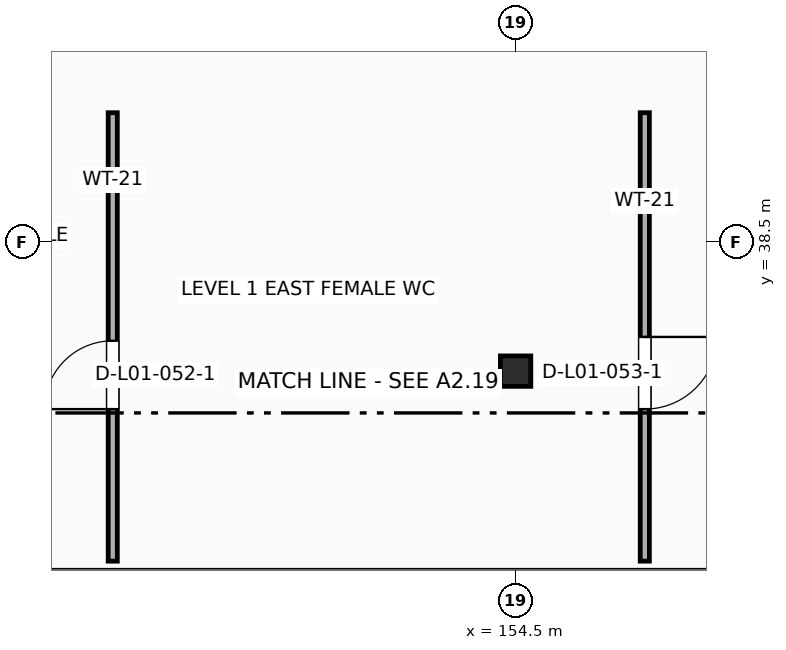
"""IFC4 building model, lengths in metres.
Left out: names, types, materials, properties, quantities, classifications, styles, units other than length and angle.
Written with IfcOpenShell. Run it as: python <this file> out.ifc"""

import sys

from ifc_helpers import new_model, si_unit, direction, frame, frame_2d, origin, origin_2d, place, context, subcontext, project, spatial, rectangle, hollow_rectangle, extrude, element, fill, save


model = new_model("IFC4")
c1 = context("Model", 3, precision=1e-05, world=origin(), true_north=direction((0.0, 1.0)))
c2 = subcontext(c1, "Body", "Model", "MODEL_VIEW")
j1 = project(units=[si_unit("LENGTHUNIT", "METRE"), si_unit("PLANEANGLEUNIT", "RADIAN")], contexts=[c1])
p1 = place(None, origin())
s1 = spatial("IfcSite", under=j1, at=p1, CompositionType="ELEMENT")
p2 = place(p1, origin())
s2 = spatial("IfcBuilding", under=s1, at=p2, CompositionType="ELEMENT")
p3 = place(p2, frame((0.0, 0.0, 5.4)))
s3 = spatial("IfcBuildingStorey", under=s2, at=p3, CompositionType="ELEMENT", Elevation=5.4)
p4 = place(p3, frame((154.5, 36.8, 0.0), z_axis=(0.0, 0.0, 1.0), x_axis=(1.0, 0.0, 0.0)))
e1 = element("IfcColumn", 1, at=p4, inside=s3, PredefinedType="COLUMN", context=c2, shape_type="SweptSolid", body=[
    extrude(hollow_rectangle(XDim=0.4, YDim=0.4, WallThickness=0.016, at=origin_2d()), origin(), (0.0, 0.0, 1.0), 4.54),
])
p5 = place(p3, frame((149.2, 34.3, 0.0), z_axis=(0.0, 0.0, 1.0), x_axis=(0.0, 1.0, 0.0)))
e2 = element("IfcWall", 2, at=p5, inside=s3, PredefinedType="PARTITIONING", context=c2, shape_type="SweptSolid", body=[
    extrude(rectangle(XDim=5.9, YDim=0.12, at=frame_2d((2.95, 0.0))), origin(), (0.0, 0.0, 1.0), 4.198),
])
p6 = place(p5, frame((2.0, 0.0, 0.0)))
e3 = element("IfcOpeningElement", 3, at=p6, cuts=e2, PredefinedType="OPENING", context=c2, shape_type="SweptSolid", body=[
    extrude(rectangle(XDim=0.9, YDim=2.15, at=frame_2d((0.45, 1.075))), frame((0.0, 0.072, 0.0), z_axis=(0.0, -1.0, 0.0), x_axis=(1.0, 0.0, 0.0)), (0.0, 0.0, 1.0), 0.144),
])
p7 = place(p3, frame((156.2, 34.3, 0.0), z_axis=(0.0, 0.0, 1.0), x_axis=(0.0, 1.0, 0.0)))
e4 = element("IfcWall", 4, at=p7, inside=s3, PredefinedType="PARTITIONING", context=c2, shape_type="SweptSolid", body=[
    extrude(rectangle(XDim=5.9, YDim=0.12, at=frame_2d((2.95, 0.0))), origin(), (0.0, 0.0, 1.0), 3.85),
])
p8 = place(p7, frame((2.0, 0.0, 0.0)))
e5 = element("IfcOpeningElement", 5, at=p8, cuts=e4, PredefinedType="OPENING", context=c2, shape_type="SweptSolid", body=[
    extrude(rectangle(XDim=0.95, YDim=2.15, at=frame_2d((0.475, 1.075))), frame((0.0, 0.072, 0.0), z_axis=(0.0, -1.0, 0.0), x_axis=(1.0, 0.0, 0.0)), (0.0, 0.0, 1.0), 0.144),
])
p9 = place(p6, origin())
e6 = element("IfcDoor", 6, at=p9, inside=s3, OperationType="SINGLE_SWING_LEFT", PredefinedType="DOOR", context=c2, shape_type="SweptSolid", body=[
    extrude(rectangle(XDim=0.9, YDim=2.15, at=frame_2d((0.45, 1.075))), frame((0.0, 0.025, 0.0), z_axis=(0.0, -1.0, 0.0), x_axis=(1.0, 0.0, 0.0)), (0.0, 0.0, 1.0), 0.05),
])
fill(e3, e6)
p10 = place(p8, frame((0.95, 0.0, 0.0), z_axis=(0.0, 0.0, 1.0), x_axis=(-1.0, 0.0, 0.0)))
e7 = element("IfcDoor", 7, at=p10, inside=s3, OperationType="SINGLE_SWING_RIGHT", PredefinedType="DOOR", context=c2, shape_type="SweptSolid", body=[
    extrude(rectangle(XDim=0.95, YDim=2.15, at=frame_2d((0.475, 1.075))), frame((0.0, 0.025, 0.0), z_axis=(0.0, -1.0, 0.0), x_axis=(1.0, 0.0, 0.0)), (0.0, 0.0, 1.0), 0.05),
])
fill(e5, e7)
save(model, sys.argv[1])
